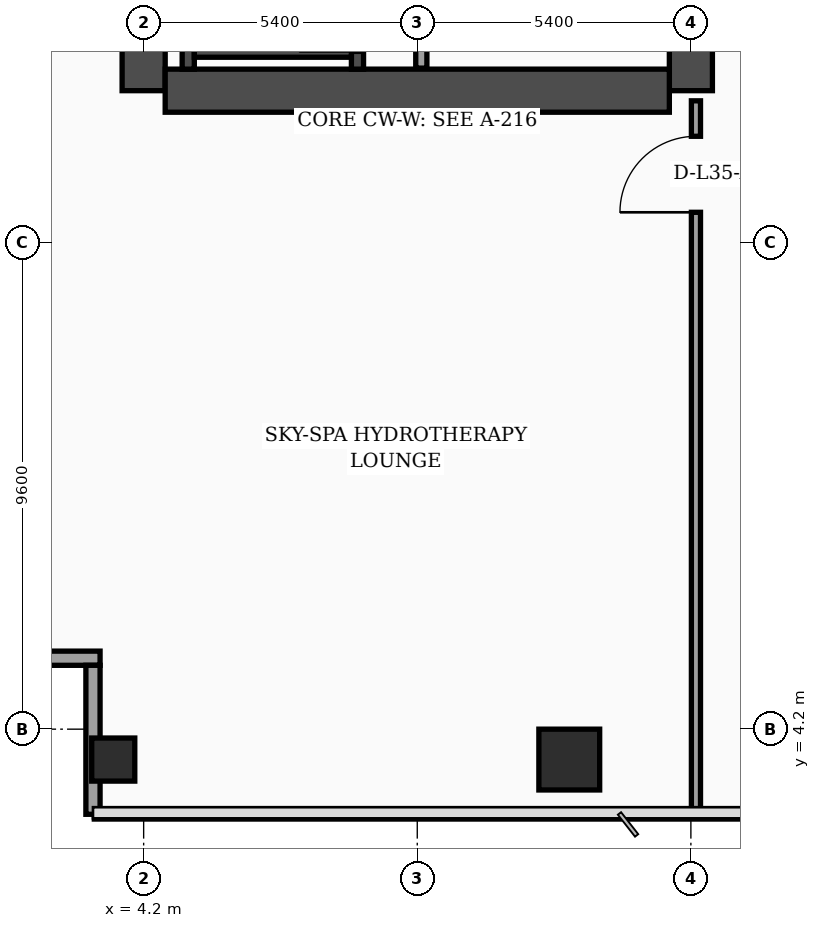
"""IFC4 building model, lengths in metres.
Left out: names, types, materials, properties, quantities, classifications, styles, units other than length and angle.
Written with IfcOpenShell. Run it as: python <this file> out.ifc"""

import sys

from ifc_helpers import new_model, si_unit, direction, frame, frame_2d, origin, origin_2d, place, context, subcontext, project, spatial, rectangle, hollow_rectangle, extrude, element, fill, save


model = new_model("IFC4")
c1 = context("Model", 3, precision=1e-05, world=origin(), true_north=direction((0.0, 1.0)))
c2 = subcontext(c1, "Body", "Model", "MODEL_VIEW")
j1 = project(units=[si_unit("LENGTHUNIT", "METRE"), si_unit("PLANEANGLEUNIT", "RADIAN")], contexts=[c1])
p1 = place(None, origin())
s1 = spatial("IfcSite", under=j1, at=p1, CompositionType="ELEMENT")
p2 = place(p1, origin())
s2 = spatial("IfcBuilding", under=s1, at=p2, CompositionType="ELEMENT")
p3 = place(p2, frame((0.0, 0.0, 144.0)))
s3 = spatial("IfcBuildingStorey", under=s2, at=p3, CompositionType="ELEMENT", Elevation=144.0)
p4 = place(p3, frame((4.2, 16.8, 0.0), z_axis=(0.0, 0.0, 1.0), x_axis=(0.0, 1.0, 0.0)))
e1 = element("IfcWall", 1, at=p4, inside=s3, PredefinedType="SHEAR", context=c2, shape_type="SweptSolid", body=[
    extrude(rectangle(XDim=21.6, YDim=0.85, at=frame_2d((10.8, 0.0))), origin(), (0.0, 0.0, 1.0), 4.26),
])
p5 = place(p3, frame((15.0, 16.8, 0.0), z_axis=(0.0, 0.0, 1.0), x_axis=(0.0, 1.0, 0.0)))
e2 = element("IfcWall", 2, at=p5, inside=s3, PredefinedType="SHEAR", context=c2, shape_type="SweptSolid", body=[
    extrude(rectangle(XDim=21.6, YDim=0.85, at=frame_2d((10.8, 0.0))), origin(), (0.0, 0.0, 1.0), 4.26),
])
p6 = place(p5, frame((8.65, 0.0, 0.0)))
e3 = element("IfcOpeningElement", 3, at=p6, cuts=e2, PredefinedType="OPENING", context=c2, shape_type="SweptSolid", body=[
    extrude(rectangle(XDim=1.1, YDim=2.2, at=frame_2d((0.55, 1.1))), frame((0.0, 0.435, 0.0), z_axis=(0.0, -1.0, 0.0), x_axis=(1.0, 0.0, 0.0)), (0.0, 0.0, 1.0), 0.87),
])
p7 = place(p5, frame((10.85, 0.0, 0.0)))
e4 = element("IfcOpeningElement", 4, at=p7, cuts=e2, PredefinedType="OPENING", context=c2, shape_type="SweptSolid", body=[
    extrude(rectangle(XDim=1.1, YDim=2.2, at=frame_2d((0.55, 1.1))), frame((0.0, 0.435, 0.0), z_axis=(0.0, -1.0, 0.0), x_axis=(1.0, 0.0, 0.0)), (0.0, 0.0, 1.0), 0.87),
])
p8 = place(p5, frame((13.5, 0.0, 0.0)))
e5 = element("IfcOpeningElement", 5, at=p8, cuts=e2, PredefinedType="OPENING", context=c2, shape_type="SweptSolid", body=[
    extrude(rectangle(XDim=1.1, YDim=2.2, at=frame_2d((0.55, 1.1))), frame((0.0, 0.435, 0.0), z_axis=(0.0, -1.0, 0.0), x_axis=(1.0, 0.0, 0.0)), (0.0, 0.0, 1.0), 0.87),
])
p9 = place(p5, frame((16.15, 0.0, 0.0)))
e6 = element("IfcOpeningElement", 6, at=p9, cuts=e2, PredefinedType="OPENING", context=c2, shape_type="SweptSolid", body=[
    extrude(rectangle(XDim=1.1, YDim=2.2, at=frame_2d((0.55, 1.1))), frame((0.0, 0.435, 0.0), z_axis=(0.0, -1.0, 0.0), x_axis=(1.0, 0.0, 0.0)), (0.0, 0.0, 1.0), 0.87),
])
p10 = place(p5, frame((18.9, 0.0, 0.0)))
e7 = element("IfcOpeningElement", 7, at=p10, cuts=e2, PredefinedType="OPENING", context=c2, shape_type="SweptSolid", body=[
    extrude(rectangle(XDim=1.1, YDim=2.2, at=frame_2d((0.55, 1.1))), frame((0.0, 0.435, 0.0), z_axis=(0.0, -1.0, 0.0), x_axis=(1.0, 0.0, 0.0)), (0.0, 0.0, 1.0), 0.87),
])
p11 = place(p3, frame((4.625, 16.8, 0.0), z_axis=(0.0, 0.0, 1.0), x_axis=(1.0, 0.0, 0.0)))
e8 = element("IfcWall", 8, at=p11, inside=s3, PredefinedType="SHEAR", context=c2, shape_type="SweptSolid", body=[
    extrude(rectangle(XDim=9.95, YDim=0.85, at=frame_2d((4.975, 0.0))), origin(), (0.0, 0.0, 1.0), 4.26),
])
p12 = place(p3, frame((5.08, 17.225, 0.0), z_axis=(0.0, 0.0, 1.0), x_axis=(0.0, 1.0, 0.0)))
e9 = element("IfcWall", 9, at=p12, inside=s3, PredefinedType="SOLIDWALL", context=c2, shape_type="SweptSolid", body=[
    extrude(rectangle(XDim=9.565, YDim=0.24, at=frame_2d((4.782, 0.0))), origin(), (0.0, 0.0, 1.0), 4.26),
])
p13 = place(p3, frame((8.42, 17.225, 0.0), z_axis=(0.0, 0.0, 1.0), x_axis=(0.0, 1.0, 0.0)))
e10 = element("IfcWall", 10, at=p13, inside=s3, PredefinedType="SOLIDWALL", context=c2, shape_type="SweptSolid", body=[
    extrude(rectangle(XDim=9.565, YDim=0.24, at=frame_2d((4.782, 0.0))), origin(), (0.0, 0.0, 1.0), 4.26),
])
p14 = place(p13, frame((0.35, 0.0, 0.0)))
e11 = element("IfcOpeningElement", 11, at=p14, cuts=e10, PredefinedType="OPENING", context=c2, shape_type="SweptSolid", body=[
    extrude(rectangle(XDim=1.15, YDim=2.2, at=frame_2d((0.575, 1.1))), frame((0.0, 0.13, 0.0), z_axis=(0.0, -1.0, 0.0), x_axis=(1.0, 0.0, 0.0)), (0.0, 0.0, 1.0), 0.26),
])
p15 = place(p3, frame((5.2, 17.58, 0.0), z_axis=(0.0, 0.0, 1.0), x_axis=(1.0, 0.0, 0.0)))
e12 = element("IfcWall", 12, at=p15, inside=s3, PredefinedType="SOLIDWALL", context=c2, shape_type="SweptSolid", body=[
    extrude(rectangle(XDim=3.1, YDim=0.24, at=frame_2d((1.55, 0.0))), origin(), (0.0, 0.0, 1.0), 4.26),
])
p16 = place(p3, frame((3.6, 3.6, 0.0), z_axis=(0.0, 0.0, 1.0), x_axis=(1.0, 0.0, 0.0)))
e13 = element("IfcColumn", 13, at=p16, inside=s3, PredefinedType="COLUMN", context=c2, shape_type="SweptSolid", body=[
    extrude(hollow_rectangle(XDim=0.85, YDim=0.85, WallThickness=0.036, at=origin_2d()), origin(), (0.0, 0.0, 1.0), 4.26),
])
p17 = place(p3, frame((12.6, 3.6, 0.0), z_axis=(0.0, 0.0, 1.0), x_axis=(1.0, 0.0, 0.0)))
e14 = element("IfcColumn", 14, at=p17, inside=s3, PredefinedType="COLUMN", context=c2, shape_type="SweptSolid", body=[
    extrude(rectangle(XDim=1.2, YDim=1.2, at=origin_2d()), origin(), (0.0, 0.0, 1.0), 4.26),
])
p18 = place(p3, frame((0.12, 5.6, 0.0), z_axis=(0.0, 0.0, 1.0), x_axis=(1.0, 0.0, 0.0)))
e15 = element("IfcWall", 15, at=p18, inside=s3, PredefinedType="SOLIDWALL", context=c2, shape_type="SweptSolid", body=[
    extrude(rectangle(XDim=3.22, YDim=0.28, at=frame_2d((1.61, 0.0))), origin(), (0.0, 0.0, 1.0), 3.64),
])
p19 = place(p3, frame((3.2, 5.46, 0.0), z_axis=(0.0, 0.0, 1.0), x_axis=(0.0, -1.0, 0.0)))
e16 = element("IfcWall", 16, at=p19, inside=s3, PredefinedType="SOLIDWALL", context=c2, shape_type="SweptSolid", body=[
    extrude(rectangle(XDim=2.94, YDim=0.28, at=frame_2d((1.47, 0.0))), origin(), (0.0, 0.0, 1.0), 3.64),
])
p20 = place(p3, frame((9.68, 17.245, 0.0), z_axis=(0.0, 0.0, 1.0), x_axis=(0.0, 1.0, 0.0)))
e17 = element("IfcWall", 17, at=p20, inside=s3, PredefinedType="SOLIDWALL", context=c2, shape_type="SweptSolid", body=[
    extrude(rectangle(XDim=7.755, YDim=0.22, at=frame_2d((3.877, 0.0))), origin(), (0.0, 0.0, 1.0), 4.26),
])
p21 = place(p3, frame((15.1, 2.6, 0.0), z_axis=(0.0, 0.0, 1.0), x_axis=(0.0, 1.0, 0.0)))
e18 = element("IfcWall", 18, at=p21, inside=s3, PredefinedType="PARTITIONING", context=c2, shape_type="SweptSolid", body=[
    extrude(rectangle(XDim=14.0, YDim=0.18, at=frame_2d((7.0, 0.0))), origin(), (0.0, 0.0, 1.0), 3.19),
])
p22 = place(p21, frame((11.8, 0.0, 0.0)))
e19 = element("IfcOpeningElement", 19, at=p22, cuts=e18, PredefinedType="OPENING", context=c2, shape_type="SweptSolid", body=[
    extrude(rectangle(XDim=1.5, YDim=2.22, at=frame_2d((0.75, 1.11))), frame((0.0, 0.1, 0.0), z_axis=(0.0, -1.0, 0.0), x_axis=(1.0, 0.0, 0.0)), (0.0, 0.0, 1.0), 0.2),
])
p23 = place(p22, origin())
e20 = element("IfcDoor", 20, at=p23, inside=s3, OperationType="SINGLE_SWING_LEFT", PredefinedType="DOOR", context=c2, shape_type="SweptSolid", body=[
    extrude(rectangle(XDim=1.5, YDim=2.22, at=frame_2d((0.75, 1.11))), frame((0.0, 0.025, 0.0), z_axis=(0.0, -1.0, 0.0), x_axis=(1.0, 0.0, 0.0)), (0.0, 0.0, 1.0), 0.05),
])
fill(e19, e20)
save(model, sys.argv[1])
